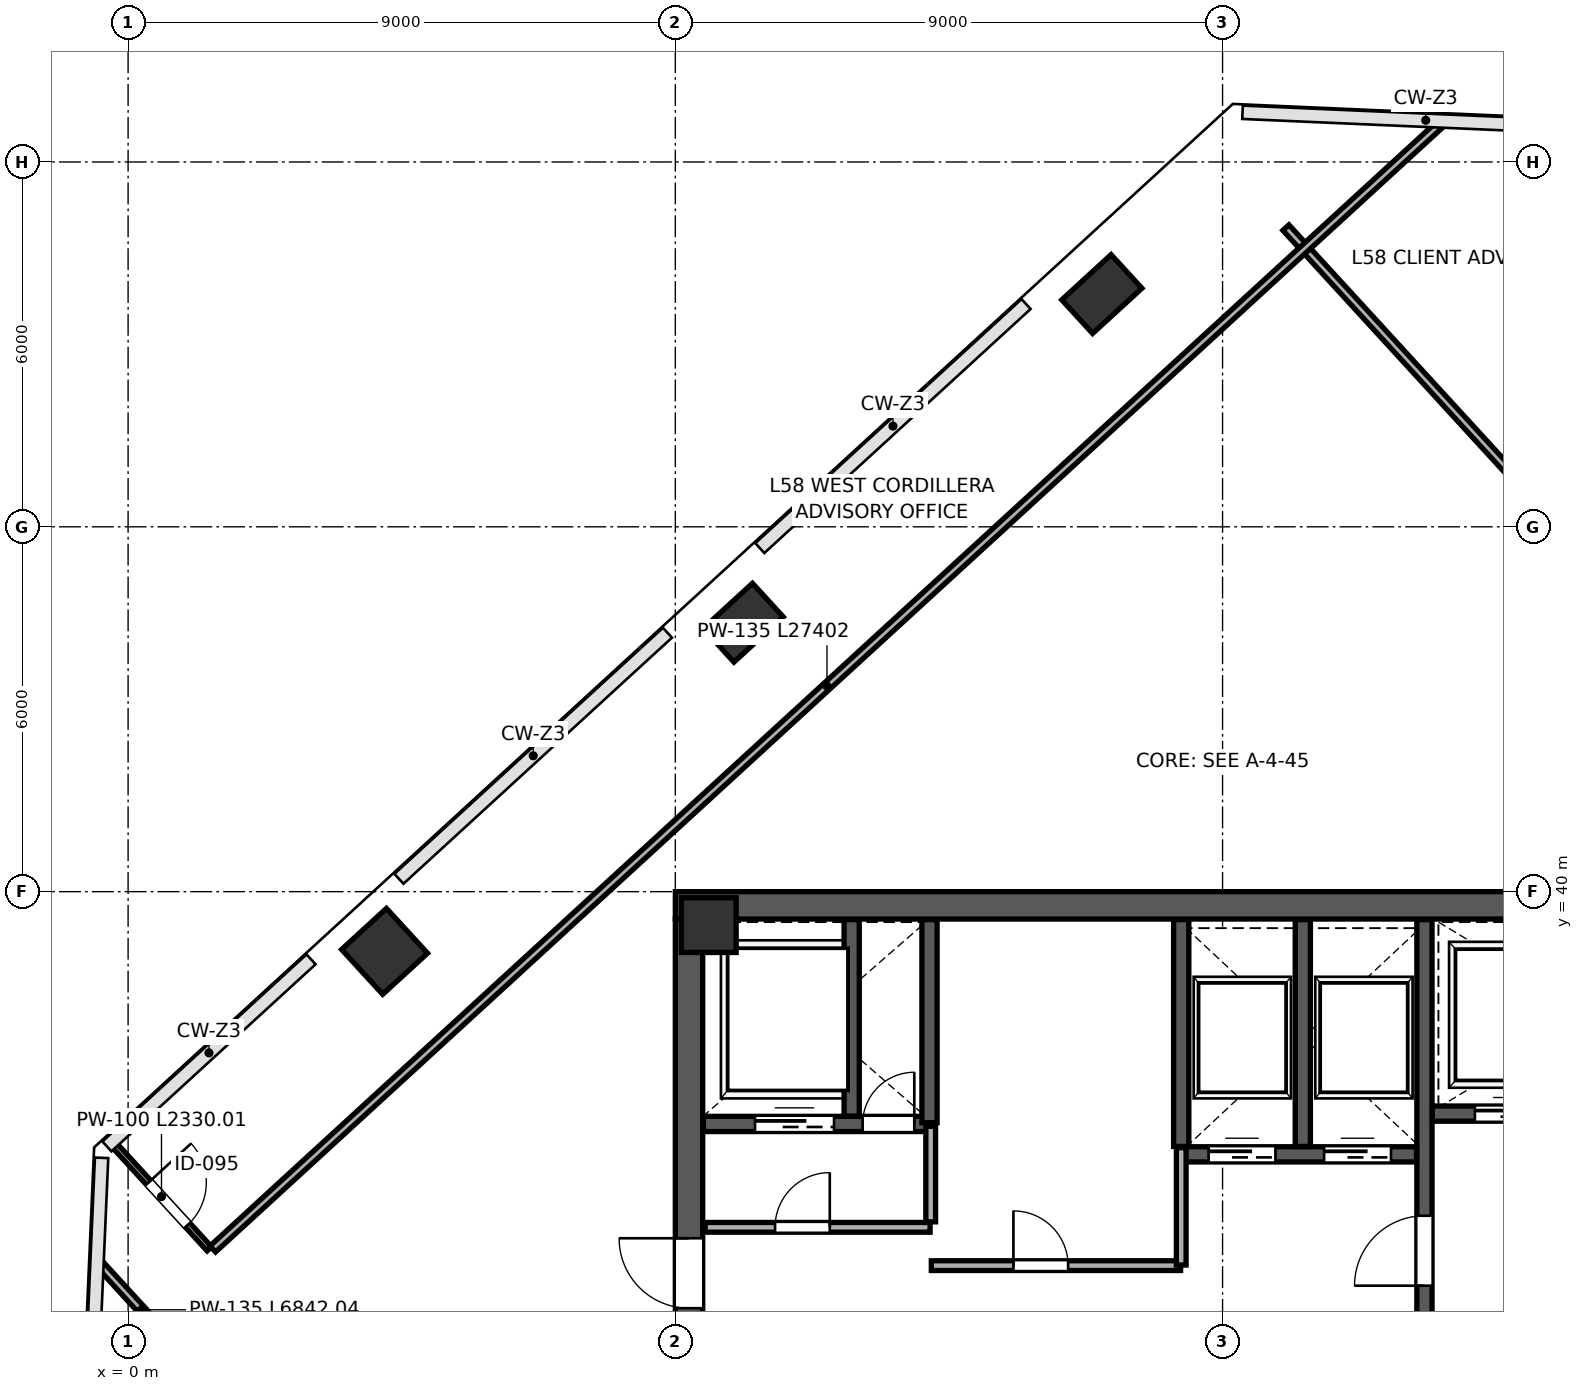
"""IFC4 building model, lengths in metres.
Left out: names, types, materials, properties, quantities, classifications, styles, units other than length and angle.
Written with IfcOpenShell. Run it as: python <this file> out.ifc"""

import sys

from ifc_helpers import new_model, si_unit, direction, frame, frame_2d, origin, origin_2d, place, context, subcontext, project, spatial, rectangle, extrude, source, transform, mapped, element, fill, save


model = new_model("IFC4")
c1 = context("Model", 3, precision=1e-05, world=origin(), true_north=direction((0.0, 1.0)))
c2 = subcontext(c1, "Body", "Model", "MODEL_VIEW")
j1 = project(units=[si_unit("LENGTHUNIT", "METRE"), si_unit("PLANEANGLEUNIT", "RADIAN")], contexts=[c1])
p1 = place(None, origin())
s1 = spatial("IfcSite", under=j1, at=p1, CompositionType="ELEMENT")
p2 = place(p1, origin())
s2 = spatial("IfcBuilding", under=s1, at=p2, CompositionType="ELEMENT")
p3 = place(p2, frame((0.0, 0.0, 258.4)))
s3 = spatial("IfcBuildingStorey", under=s2, at=p3, CompositionType="ELEMENT", Elevation=258.4)
m1 = source(origin(), c2, "Body", "SweptSolid", [
    extrude(rectangle(XDim=0.9, YDim=0.9, at=origin_2d()), origin(), (0.0, 0.0, 1.0), 4.199),
])
p4 = place(p3, frame((9.55, 39.45, 0.001), z_axis=(0.0, 0.0, 1.0), x_axis=(1.0, 0.0, 0.0)))
e1 = element("IfcColumn", 1, at=p4, inside=s3, PredefinedType="COLUMN", context=c2, shape_type="MappedRepresentation", body=[
    mapped(m1, transform((0.0, 0.0, 0.0), scale=1.0)),
])
m2 = source(origin(), c2, "Body", "SweptSolid", [
    extrude(rectangle(XDim=1.0, YDim=1.0, at=origin_2d()), origin(), (0.0, 0.0, 1.0), 4.199),
])
p5 = place(p3, frame((4.218, 39.018, 0.001), z_axis=(0.0, 0.0, 1.0), x_axis=(-0.675590207616, 0.73727733681, 0.0)))
e2 = element("IfcColumn", 2, at=p5, inside=s3, PredefinedType="COLUMN", context=c2, shape_type="MappedRepresentation", body=[
    mapped(m2, transform((0.0, 0.0, 0.0), scale=1.0)),
])
m3 = source(origin(), c2, "Body", "SweptSolid", [
    extrude(rectangle(XDim=0.75, YDim=1.1, at=origin_2d()), origin(), (0.0, 0.0, 1.0), 4.199),
])
for number, where, z_axis, x_axis in (
    (3, (10.116, 44.423, 0.001), (0.0, 0.0, 1.0), (-0.676, 0.737, 0.0)),
    (4, (16.014, 49.828, 0.001), (0.0, 0.0, 1.0), (-0.676, 0.737, 0.0)),
):
    element("IfcColumn", number, at=place(p3, frame(where, z_axis=z_axis, x_axis=x_axis)), inside=s3, PredefinedType="PILASTER", context=c2, shape_type="MappedRepresentation", body=[
        mapped(m3, transform((0.0, 0.0, 0.0), scale=1.0)),
    ])
p6 = place(p3, frame((9.225, 24.45, 0.0), z_axis=(0.0, 0.0, 1.0), x_axis=(0.0, 1.0, 0.0)))
e5 = element("IfcWall", 5, at=p6, inside=s3, PredefinedType="SHEAR", context=c2, shape_type="SweptSolid", body=[
    extrude(rectangle(XDim=15.1, YDim=0.45, at=frame_2d((7.55, 0.0))), origin(), (0.0, 0.0, 1.0), 3.96),
])
p7 = place(p6, frame((8.7, 0.0, 0.0)))
e6 = element("IfcOpeningElement", 6, at=p7, cuts=e5, PredefinedType="OPENING", context=c2, shape_type="SweptSolid", body=[
    extrude(rectangle(XDim=1.15, YDim=2.2, at=frame_2d((0.575, 1.1))), frame((0.0, 0.235, 0.0), z_axis=(0.0, -1.0, 0.0), x_axis=(1.0, 0.0, 0.0)), (0.0, 0.0, 1.0), 0.47),
])
p8 = place(p3, frame((9.0, 39.775, 0.0), z_axis=(0.0, 0.0, 1.0), x_axis=(1.0, 0.0, 0.0)))
e7 = element("IfcWall", 7, at=p8, inside=s3, PredefinedType="SHEAR", context=c2, shape_type="SweptSolid", body=[
    extrude(rectangle(XDim=18.0, YDim=0.45, at=frame_2d((9.0, 0.0))), origin(), (0.0, 0.0, 1.0), 3.96),
])
p9 = place(p3, frame((21.32, 32.12, 0.0), z_axis=(0.0, 0.0, 1.0), x_axis=(0.0, 1.0, 0.0)))
e8 = element("IfcWall", 8, at=p9, inside=s3, PredefinedType="SHEAR", context=c2, shape_type="SweptSolid", body=[
    extrude(rectangle(XDim=7.42, YDim=0.25, at=frame_2d((3.71, 0.0))), origin(), (0.0, 0.0, 1.0), 3.96),
])
p10 = place(p9, frame((1.4, 0.0, 0.0)))
e9 = element("IfcOpeningElement", 9, at=p10, cuts=e8, PredefinedType="OPENING", context=c2, shape_type="SweptSolid", body=[
    extrude(rectangle(XDim=1.15, YDim=2.2, at=frame_2d((0.575, 1.1))), frame((0.0, 0.135, 0.0), z_axis=(0.0, -1.0, 0.0), x_axis=(1.0, 0.0, 0.0)), (0.0, 0.0, 1.0), 0.27),
])
p11 = place(p3, frame((9.46, 36.18, 0.0), z_axis=(0.0, 0.0, 1.0), x_axis=(1.0, 0.0, 0.0)))
e10 = element("IfcWall", 10, at=p11, inside=s3, PredefinedType="SHEAR", context=c2, shape_type="SweptSolid", body=[
    extrude(rectangle(XDim=3.79, YDim=0.25, at=frame_2d((1.895, 0.0))), origin(), (0.0, 0.0, 1.0), 3.96),
])
p12 = place(p11, frame((2.62, 0.0, 0.0)))
e11 = element("IfcOpeningElement", 11, at=p12, cuts=e10, PredefinedType="OPENING", context=c2, shape_type="SweptSolid", body=[
    extrude(rectangle(XDim=0.85, YDim=2.1, at=frame_2d((0.425, 1.05))), frame((0.0, 0.135, 0.0), z_axis=(0.0, -1.0, 0.0), x_axis=(1.0, 0.0, 0.0)), (0.0, 0.0, 1.0), 0.27),
])
p13 = place(p11, frame((0.85, 0.0, 0.0)))
e12 = element("IfcOpeningElement", 12, at=p13, cuts=e10, PredefinedType="OPENING", context=c2, shape_type="SweptSolid", body=[
    extrude(rectangle(XDim=1.3, YDim=2.25, at=frame_2d((0.65, 1.125))), frame((0.0, 0.135, 0.0), z_axis=(0.0, -1.0, 0.0), x_axis=(1.0, 0.0, 0.0)), (0.0, 0.0, 1.0), 0.27),
])
p14 = place(p3, frame((11.9, 36.31, 0.0), z_axis=(0.0, 0.0, 1.0), x_axis=(0.0, 1.0, 0.0)))
e13 = element("IfcWall", 13, at=p14, inside=s3, PredefinedType="SHEAR", context=c2, shape_type="SweptSolid", body=[
    extrude(rectangle(XDim=3.23, YDim=0.25, at=frame_2d((1.615, 0.0))), origin(), (0.0, 0.0, 1.0), 3.96),
])
p15 = place(p3, frame((21.45, 36.35, 0.0), z_axis=(0.0, 0.0, 1.0), x_axis=(1.0, 0.0, 0.0)))
e14 = element("IfcWall", 14, at=p15, inside=s3, PredefinedType="SHEAR", context=c2, shape_type="SweptSolid", body=[
    extrude(rectangle(XDim=5.09, YDim=0.25, at=frame_2d((2.545, 0.0))), origin(), (0.0, 0.0, 1.0), 3.96),
])
p16 = place(p15, frame((0.7, 0.0, 0.0)))
e15 = element("IfcOpeningElement", 15, at=p16, cuts=e14, PredefinedType="OPENING", context=c2, shape_type="SweptSolid", body=[
    extrude(rectangle(XDim=1.2, YDim=2.2, at=frame_2d((0.6, 1.1))), frame((0.0, 0.135, 0.0), z_axis=(0.0, -1.0, 0.0), x_axis=(1.0, 0.0, 0.0)), (0.0, 0.0, 1.0), 0.27),
])
p17 = place(p15, frame((3.25, 0.0, 0.0)))
e16 = element("IfcOpeningElement", 16, at=p17, cuts=e14, PredefinedType="OPENING", context=c2, shape_type="SweptSolid", body=[
    extrude(rectangle(XDim=1.2, YDim=2.2, at=frame_2d((0.6, 1.1))), frame((0.0, 0.135, 0.0), z_axis=(0.0, -1.0, 0.0), x_axis=(1.0, 0.0, 0.0)), (0.0, 0.0, 1.0), 0.27),
])
p18 = place(p3, frame((13.18, 36.2, 0.0), z_axis=(0.0, 0.0, 1.0), x_axis=(0.0, 1.0, 0.0)))
e17 = element("IfcWall", 17, at=p18, inside=s3, PredefinedType="SHEAR", context=c2, shape_type="SweptSolid", body=[
    extrude(rectangle(XDim=3.34, YDim=0.25, at=frame_2d((1.67, 0.0))), origin(), (0.0, 0.0, 1.0), 3.96),
])
p19 = place(p3, frame((17.32, 35.68, 0.0), z_axis=(0.0, 0.0, 1.0), x_axis=(1.0, 0.0, 0.0)))
e18 = element("IfcWall", 18, at=p19, inside=s3, PredefinedType="SHEAR", context=c2, shape_type="SweptSolid", body=[
    extrude(rectangle(XDim=3.87, YDim=0.25, at=frame_2d((1.935, 0.0))), origin(), (0.0, 0.0, 1.0), 3.96),
])
p20 = place(p19, frame((0.45, 0.0, 0.0)))
e19 = element("IfcOpeningElement", 19, at=p20, cuts=e18, PredefinedType="OPENING", context=c2, shape_type="SweptSolid", body=[
    extrude(rectangle(XDim=1.1, YDim=2.2, at=frame_2d((0.55, 1.1))), frame((0.0, 0.135, 0.0), z_axis=(0.0, -1.0, 0.0), x_axis=(1.0, 0.0, 0.0)), (0.0, 0.0, 1.0), 0.27),
])
p21 = place(p19, frame((2.35, 0.0, 0.0)))
e20 = element("IfcOpeningElement", 20, at=p21, cuts=e18, PredefinedType="OPENING", context=c2, shape_type="SweptSolid", body=[
    extrude(rectangle(XDim=1.1, YDim=2.2, at=frame_2d((0.55, 1.1))), frame((0.0, 0.135, 0.0), z_axis=(0.0, -1.0, 0.0), x_axis=(1.0, 0.0, 0.0)), (0.0, 0.0, 1.0), 0.27),
])
for number, where, z_axis, x_axis in (
    (21, (17.32, 35.81, 0.0), (0.0, 0.0, 1.0), (0.0, 1.0, 0.0)),
    (22, (19.32, 35.81, 0.0), (0.0, 0.0, 1.0), (0.0, 1.0, 0.0)),
):
    element("IfcWall", number, at=place(p3, frame(where, z_axis=z_axis, x_axis=x_axis)), inside=s3, PredefinedType="SHEAR", context=c2, shape_type="SweptSolid", body=[
        extrude(rectangle(XDim=3.73, YDim=0.25, at=frame_2d((1.865, 0.0))), origin(), (0.0, 0.0, 1.0), 3.96),
    ])
p22 = place(p3, frame((9.49, 34.48, 0.0), z_axis=(0.0, 0.0, 1.0), x_axis=(1.0, 0.0, 0.0)))
e23 = element("IfcWall", 23, at=p22, inside=s3, PredefinedType="PARTITIONING", context=c2, shape_type="SweptSolid", body=[
    extrude(rectangle(XDim=3.7, YDim=0.16, at=frame_2d((1.85, 0.0))), origin(), (0.0, 0.0, 1.0), 3.96),
])
p23 = place(p22, frame((1.15, 0.0, 0.0)))
e24 = element("IfcOpeningElement", 24, at=p23, cuts=e23, PredefinedType="OPENING", context=c2, shape_type="SweptSolid", body=[
    extrude(rectangle(XDim=0.9, YDim=2.15, at=frame_2d((0.45, 1.075))), frame((0.0, 0.09, 0.0), z_axis=(0.0, -1.0, 0.0), x_axis=(1.0, 0.0, 0.0)), (0.0, 0.0, 1.0), 0.18),
])
p24 = place(p3, frame((13.2, 34.57, 0.0), z_axis=(0.0, 0.0, 1.0), x_axis=(0.0, 1.0, 0.0)))
e25 = element("IfcWall", 25, at=p24, inside=s3, PredefinedType="PARTITIONING", context=c2, shape_type="SweptSolid", body=[
    extrude(rectangle(XDim=1.57, YDim=0.16, at=frame_2d((0.785, 0.0))), origin(), (0.0, 0.0, 1.0), 3.96),
])
p25 = place(p3, frame((13.21, 33.85, 0.0), z_axis=(0.0, 0.0, 1.0), x_axis=(1.0, 0.0, 0.0)))
e26 = element("IfcWall", 26, at=p25, inside=s3, PredefinedType="PARTITIONING", context=c2, shape_type="SweptSolid", body=[
    extrude(rectangle(XDim=4.1, YDim=0.16, at=frame_2d((2.05, 0.0))), origin(), (0.0, 0.0, 1.0), 3.96),
])
p26 = place(p25, frame((1.35, 0.0, 0.0)))
e27 = element("IfcOpeningElement", 27, at=p26, cuts=e26, PredefinedType="OPENING", context=c2, shape_type="SweptSolid", body=[
    extrude(rectangle(XDim=0.9, YDim=2.15, at=frame_2d((0.45, 1.075))), frame((0.0, 0.09, 0.0), z_axis=(0.0, -1.0, 0.0), x_axis=(1.0, 0.0, 0.0)), (0.0, 0.0, 1.0), 0.18),
])
p27 = place(p3, frame((17.32, 33.86, 0.0), z_axis=(0.0, 0.0, 1.0), x_axis=(0.0, 1.0, 0.0)))
e28 = element("IfcWall", 28, at=p27, inside=s3, PredefinedType="PARTITIONING", context=c2, shape_type="SweptSolid", body=[
    extrude(rectangle(XDim=1.93, YDim=0.16, at=frame_2d((0.965, 0.0))), origin(), (0.0, 0.0, 1.0), 3.96),
])
p28 = place(p3, frame((-0.474, 33.881, 0.0), z_axis=(0.0, 0.0, 1.0), x_axis=(0.675605050901, -0.73726373517, 0.0)))
e29 = element("IfcWall", 29, at=p28, inside=s3, PredefinedType="PARTITIONING", context=c2, shape_type="SweptSolid", body=[
    extrude(rectangle(XDim=6.842, YDim=0.135, at=frame_2d((3.421, 0.0))), origin(), (0.0, 0.0, 1.0), 3.96),
])
p29 = place(p28, frame((2.32, 0.0, 0.0)))
e30 = element("IfcOpeningElement", 30, at=p29, cuts=e29, PredefinedType="OPENING", context=c2, shape_type="SweptSolid", body=[
    extrude(rectangle(XDim=0.9, YDim=2.15, at=frame_2d((0.45, 1.075))), frame((0.0, 0.078, 0.0), z_axis=(0.0, -1.0, 0.0), x_axis=(1.0, 0.0, 0.0)), (0.0, 0.0, 1.0), 0.155),
])
p30 = place(p28, frame((4.42, 0.0, 0.0)))
e31 = element("IfcOpeningElement", 31, at=p30, cuts=e29, PredefinedType="OPENING", context=c2, shape_type="SweptSolid", body=[
    extrude(rectangle(XDim=0.95, YDim=2.15, at=frame_2d((0.475, 1.075))), frame((0.0, 0.078, 0.0), z_axis=(0.0, -1.0, 0.0), x_axis=(1.0, 0.0, 0.0)), (0.0, 0.0, 1.0), 0.155),
])
p31 = place(p3, frame((19.042, 50.92, 0.0), z_axis=(0.0, 0.0, 1.0), x_axis=(0.675589646996, -0.737277850523, 0.0)))
e32 = element("IfcWall", 32, at=p31, inside=s3, PredefinedType="PARTITIONING", context=c2, shape_type="SweptSolid", body=[
    extrude(rectangle(XDim=21.87, YDim=0.135, at=frame_2d((10.935, 0.0))), origin(), (0.0, 0.0, 1.0), 3.96),
])
p32 = place(p31, frame((5.4, 0.0, 0.0)))
e33 = element("IfcOpeningElement", 33, at=p32, cuts=e32, PredefinedType="OPENING", context=c2, shape_type="SweptSolid", body=[
    extrude(rectangle(XDim=0.95, YDim=2.15, at=frame_2d((0.475, 1.075))), frame((0.0, 0.078, 0.0), z_axis=(0.0, -1.0, 0.0), x_axis=(1.0, 0.0, 0.0)), (0.0, 0.0, 1.0), 0.155),
])
p33 = place(p31, frame((9.4, 0.0, 0.0)))
e34 = element("IfcOpeningElement", 34, at=p33, cuts=e32, PredefinedType="OPENING", context=c2, shape_type="SweptSolid", body=[
    extrude(rectangle(XDim=0.95, YDim=2.15, at=frame_2d((0.475, 1.075))), frame((0.0, 0.078, 0.0), z_axis=(0.0, -1.0, 0.0), x_axis=(1.0, 0.0, 0.0)), (0.0, 0.0, 1.0), 0.155),
])
p34 = place(p3, frame((-0.238, 35.844, 0.0), z_axis=(0.0, 0.0, 1.0), x_axis=(0.67562972666, -0.737241122329, 0.0)))
e35 = element("IfcWall", 35, at=p34, inside=s3, PredefinedType="PARTITIONING", context=c2, shape_type="SweptSolid", body=[
    extrude(rectangle(XDim=2.33, YDim=0.1, at=frame_2d((1.165, 0.0))), origin(), (0.0, 0.0, 1.0), 3.96),
])
p35 = place(p34, frame((0.85, 0.0, 0.0)))
e36 = element("IfcOpeningElement", 36, at=p35, cuts=e35, PredefinedType="OPENING", context=c2, shape_type="SweptSolid", body=[
    extrude(rectangle(XDim=0.95, YDim=2.15, at=frame_2d((0.475, 1.075))), frame((0.0, 0.06, 0.0), z_axis=(0.0, -1.0, 0.0), x_axis=(1.0, 0.0, 0.0)), (0.0, 0.0, 1.0), 0.12),
])
p36 = place(p3, frame((1.393, 34.124, 0.0), z_axis=(0.0, 0.0, 1.0), x_axis=(0.737274323436, 0.675593496121, 0.0)))
e37 = element("IfcWall", 37, at=p36, inside=s3, PredefinedType="PARTITIONING", context=c2, shape_type="SweptSolid", body=[
    extrude(rectangle(XDim=27.402, YDim=0.135, at=frame_2d((13.701, 0.0))), origin(), (0.0, 0.0, 1.0), 3.96),
])
m4 = source(origin(), c2, "Body", "SweptSolid", [
    extrude(rectangle(XDim=1.15, YDim=2.2, at=frame_2d((0.575, 1.1))), frame((0.0, 0.025, 0.0), z_axis=(0.0, -1.0, 0.0), x_axis=(1.0, 0.0, 0.0)), (0.0, 0.0, 1.0), 0.05),
])
p37 = place(p10, origin())
e38 = element("IfcDoor", 38, at=p37, inside=s3, OperationType="SINGLE_SWING_LEFT", PredefinedType="DOOR", context=c2, shape_type="MappedRepresentation", body=[
    mapped(m4, transform((0.0, 0.0, 0.0), scale=1.0)),
])
fill(e9, e38)
p38 = place(p7, origin())
e39 = element("IfcDoor", 39, at=p38, inside=s3, OperationType="SINGLE_SWING_RIGHT", PredefinedType="DOOR", context=c2, shape_type="MappedRepresentation", body=[
    mapped(m4, transform((0.0, 0.0, 0.0), scale=1.0)),
])
fill(e6, e39)
m5 = source(origin(), c2, "Body", "SweptSolid", [
    extrude(rectangle(XDim=0.85, YDim=2.1, at=frame_2d((0.425, 1.05))), frame((0.0, 0.025, 0.0), z_axis=(0.0, -1.0, 0.0), x_axis=(1.0, 0.0, 0.0)), (0.0, 0.0, 1.0), 0.05),
])
p39 = place(p12, origin())
e40 = element("IfcDoor", 40, at=p39, inside=s3, OperationType="SINGLE_SWING_RIGHT", PredefinedType="DOOR", context=c2, shape_type="MappedRepresentation", body=[
    mapped(m5, transform((0.0, 0.0, 0.0), scale=1.0)),
])
fill(e11, e40)
m6 = source(origin(), c2, "Body", "SweptSolid", [
    extrude(rectangle(XDim=1.1, YDim=2.2, at=frame_2d((0.55, 1.1))), frame((0.0, 0.025, 0.0), z_axis=(0.0, -1.0, 0.0), x_axis=(1.0, 0.0, 0.0)), (0.0, 0.0, 1.0), 0.05),
])
p40 = place(p20, origin())
e41 = element("IfcDoor", 41, at=p40, inside=s3, OperationType="SLIDING_TO_LEFT", PredefinedType="DOOR", context=c2, shape_type="MappedRepresentation", body=[
    mapped(m6, transform((0.0, 0.0, 0.0), scale=1.0)),
])
fill(e19, e41)
p41 = place(p21, origin())
e42 = element("IfcDoor", 42, at=p41, inside=s3, OperationType="SLIDING_TO_RIGHT", PredefinedType="DOOR", context=c2, shape_type="MappedRepresentation", body=[
    mapped(m6, transform((0.0, 0.0, 0.0), scale=1.0)),
])
fill(e20, e42)
m7 = source(origin(), c2, "Body", "SweptSolid", [
    extrude(rectangle(XDim=1.2, YDim=2.2, at=frame_2d((0.6, 1.1))), frame((0.0, 0.025, 0.0), z_axis=(0.0, -1.0, 0.0), x_axis=(1.0, 0.0, 0.0)), (0.0, 0.0, 1.0), 0.05),
])
p42 = place(p16, origin())
e43 = element("IfcDoor", 43, at=p42, inside=s3, OperationType="SLIDING_TO_LEFT", PredefinedType="DOOR", context=c2, shape_type="MappedRepresentation", body=[
    mapped(m7, transform((0.0, 0.0, 0.0), scale=1.0)),
])
fill(e15, e43)
m8 = source(origin(), c2, "Body", "SweptSolid", [
    extrude(rectangle(XDim=1.3, YDim=2.25, at=frame_2d((0.65, 1.125))), frame((0.0, 0.025, 0.0), z_axis=(0.0, -1.0, 0.0), x_axis=(1.0, 0.0, 0.0)), (0.0, 0.0, 1.0), 0.05),
])
p43 = place(p13, origin())
e44 = element("IfcDoor", 44, at=p43, inside=s3, OperationType="SLIDING_TO_LEFT", PredefinedType="DOOR", context=c2, shape_type="MappedRepresentation", body=[
    mapped(m8, transform((0.0, 0.0, 0.0), scale=1.0)),
])
fill(e12, e44)
m9 = source(origin(), c2, "Body", "SweptSolid", [
    extrude(rectangle(XDim=0.9, YDim=2.15, at=frame_2d((0.45, 1.075))), frame((0.0, 0.025, 0.0), z_axis=(0.0, -1.0, 0.0), x_axis=(1.0, 0.0, 0.0)), (0.0, 0.0, 1.0), 0.05),
])
p44 = place(p23, origin())
e45 = element("IfcDoor", 45, at=p44, inside=s3, OperationType="SINGLE_SWING_RIGHT", PredefinedType="DOOR", context=c2, shape_type="MappedRepresentation", body=[
    mapped(m9, transform((0.0, 0.0, 0.0), scale=1.0)),
])
fill(e24, e45)
p45 = place(p26, origin())
e46 = element("IfcDoor", 46, at=p45, inside=s3, OperationType="SINGLE_SWING_LEFT", PredefinedType="DOOR", context=c2, shape_type="MappedRepresentation", body=[
    mapped(m9, transform((0.0, 0.0, 0.0), scale=1.0)),
])
fill(e27, e46)
m10 = source(origin(), c2, "Body", "SweptSolid", [
    extrude(rectangle(XDim=0.95, YDim=2.15, at=frame_2d((0.475, 1.075))), frame((0.0, 0.025, 0.0), z_axis=(0.0, -1.0, 0.0), x_axis=(1.0, 0.0, 0.0)), (0.0, 0.0, 1.0), 0.05),
])
p46 = place(p35, origin())
e47 = element("IfcDoor", 47, at=p46, inside=s3, OperationType="SINGLE_SWING_LEFT", PredefinedType="DOOR", context=c2, shape_type="MappedRepresentation", body=[
    mapped(m10, transform((0.0, 0.0, 0.0), scale=1.0)),
])
fill(e36, e47)
save(model, sys.argv[1])
